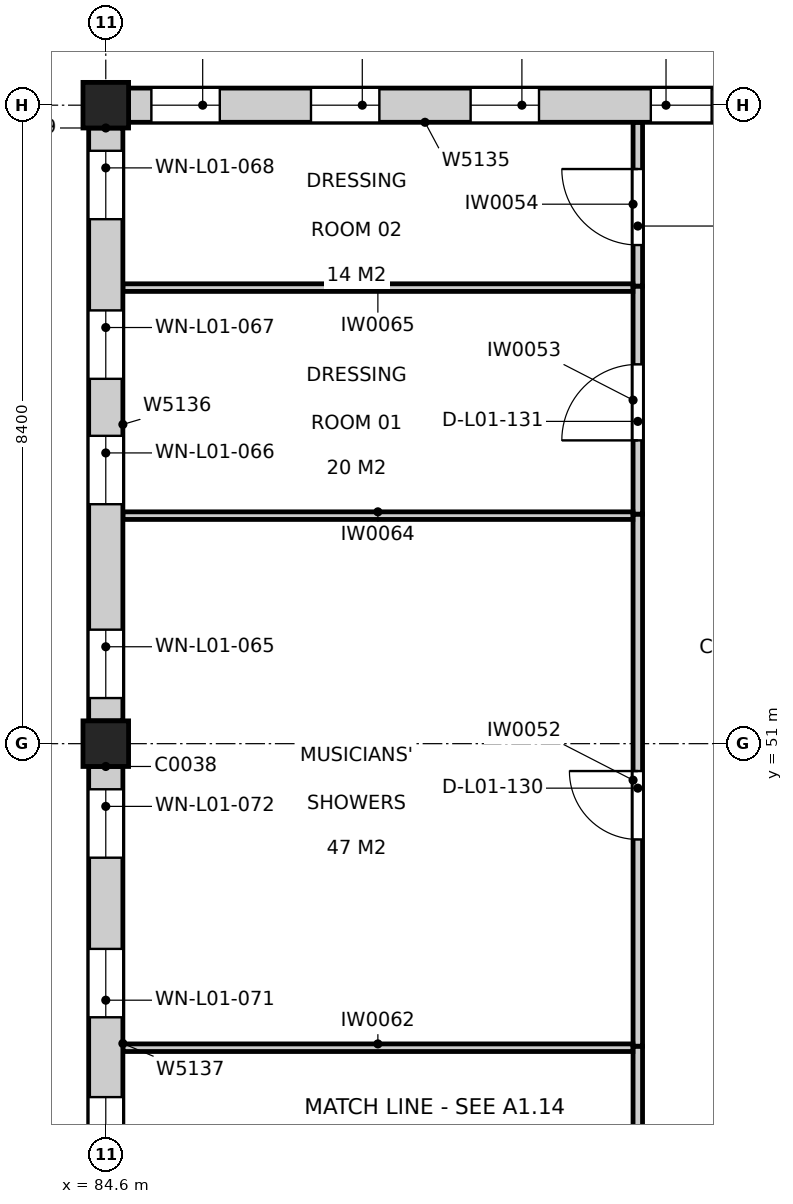
"""IFC4 building model, lengths in metres.
Left out: names, types, materials, properties, quantities, classifications, styles, units other than length and angle.
Written with IfcOpenShell. Run it as: python <this file> out.ifc"""

import sys

from ifc_helpers import new_model, si_unit, direction, frame, frame_2d, origin, origin_2d, place, context, subcontext, project, spatial, rectangle, extrude, element, fill, save


model = new_model("IFC4")
c1 = context("Model", 3, precision=1e-05, world=origin(), true_north=direction((0.0, 1.0)))
c2 = subcontext(c1, "Body", "Model", "MODEL_VIEW")
j1 = project(units=[si_unit("LENGTHUNIT", "METRE"), si_unit("PLANEANGLEUNIT", "RADIAN")], contexts=[c1])
p1 = place(None, origin())
s1 = spatial("IfcSite", under=j1, at=p1, CompositionType="ELEMENT")
p2 = place(p1, origin())
s2 = spatial("IfcBuilding", under=s1, at=p2, CompositionType="ELEMENT")
p3 = place(p2, frame((0.0, 0.0, 4.8)))
s3 = spatial("IfcBuildingStorey", under=s2, at=p3, CompositionType="ELEMENT", Elevation=4.8)
for number, where, z_axis, x_axis in (
    (1, (84.6, 51.0, 0.0), (0.0, 0.0, 1.0), (1.0, 0.0, 0.0)),
    (2, (84.6, 59.4, 0.0), (0.0, 0.0, 1.0), (1.0, 0.0, 0.0)),
):
    element("IfcColumn", number, at=place(p3, frame(where, z_axis=z_axis, x_axis=x_axis)), inside=s3, PredefinedType="COLUMN", context=c2, shape_type="SweptSolid", body=[
        extrude(rectangle(XDim=0.6, YDim=0.6, at=origin_2d()), origin(), (0.0, 0.0, 1.0), 4.8),
    ])
p4 = place(p3, frame((91.599, 42.717, 0.0), z_axis=(0.0, 0.0, 1.0), x_axis=(0.000226924598, 0.999999974253, 0.0)))
e3 = element("IfcWall", 3, at=p4, inside=s3, PredefinedType="PARTITIONING", context=c2, shape_type="SweptSolid", body=[
    extrude(rectangle(XDim=4.303, YDim=0.125, at=frame_2d((2.152, 0.0))), origin(), (0.0, 0.0, 1.0), 3.84),
])
p5 = place(p3, frame((91.6, 47.02, 0.0), z_axis=(0.0, 0.0, 1.0), x_axis=(0.0, 1.0, 0.0)))
e4 = element("IfcWall", 4, at=p5, inside=s3, PredefinedType="PARTITIONING", context=c2, shape_type="SweptSolid", body=[
    extrude(rectangle(XDim=7.0, YDim=0.125, at=frame_2d((3.5, 0.0))), origin(), (0.0, 0.0, 1.0), 3.84),
])
p6 = place(p5, frame((2.72, 0.0, 0.0)))
e5 = element("IfcOpeningElement", 5, at=p6, cuts=e4, PredefinedType="OPENING", context=c2, shape_type="SweptSolid", body=[
    extrude(rectangle(XDim=0.9, YDim=2.1, at=frame_2d((0.45, 1.05))), frame((0.0, 0.073, 0.0), z_axis=(0.0, -1.0, 0.0), x_axis=(1.0, 0.0, 0.0)), (0.0, 0.0, 1.0), 0.145),
])
p7 = place(p3, frame((91.6, 54.02, 0.0), z_axis=(0.0, 0.0, 1.0), x_axis=(0.0, 1.0, 0.0)))
e6 = element("IfcWall", 6, at=p7, inside=s3, PredefinedType="PARTITIONING", context=c2, shape_type="SweptSolid", body=[
    extrude(rectangle(XDim=3.0, YDim=0.125, at=frame_2d((1.5, 0.0))), origin(), (0.0, 0.0, 1.0), 3.94),
])
p8 = place(p7, frame((0.97, 0.0, 0.0)))
e7 = element("IfcOpeningElement", 7, at=p8, cuts=e6, PredefinedType="OPENING", context=c2, shape_type="SweptSolid", body=[
    extrude(rectangle(XDim=1.0, YDim=2.1, at=frame_2d((0.5, 1.05))), frame((0.0, 0.073, 0.0), z_axis=(0.0, -1.0, 0.0), x_axis=(1.0, 0.0, 0.0)), (0.0, 0.0, 1.0), 0.145),
])
p9 = place(p3, frame((91.6, 57.02, 0.0), z_axis=(0.0, 0.0, 1.0), x_axis=(0.0, 1.0, 0.0)))
e8 = element("IfcWall", 8, at=p9, inside=s3, PredefinedType="PARTITIONING", context=c2, shape_type="SweptSolid", body=[
    extrude(rectangle(XDim=2.155, YDim=0.125, at=frame_2d((1.077, 0.0))), origin(), (0.0, 0.0, 1.0), 4.64),
])
p10 = place(p9, frame((0.54, 0.0, 0.0)))
e9 = element("IfcOpeningElement", 9, at=p10, cuts=e8, PredefinedType="OPENING", context=c2, shape_type="SweptSolid", body=[
    extrude(rectangle(XDim=1.0, YDim=2.1, at=frame_2d((0.5, 1.05))), frame((0.0, 0.073, 0.0), z_axis=(0.0, -1.0, 0.0), x_axis=(1.0, 0.0, 0.0)), (0.0, 0.0, 1.0), 0.145),
])
p11 = place(p3, frame((84.825, 47.0, 0.0), z_axis=(0.0, 0.0, 1.0), x_axis=(1.0, 0.0, 0.0)))
e10 = element("IfcWall", 10, at=p11, inside=s3, PredefinedType="PARTITIONING", context=c2, shape_type="SweptSolid", body=[
    extrude(rectangle(XDim=6.71, YDim=0.1, at=frame_2d((3.355, 0.0))), origin(), (0.0, 0.0, 1.0), 4.64),
])
p12 = place(p3, frame((84.825, 54.0, 0.0), z_axis=(0.0, 0.0, 1.0), x_axis=(1.0, 0.0, 0.0)))
e11 = element("IfcWall", 11, at=p12, inside=s3, PredefinedType="PARTITIONING", context=c2, shape_type="SweptSolid", body=[
    extrude(rectangle(XDim=6.71, YDim=0.1, at=frame_2d((3.355, 0.0))), origin(), (0.0, 0.0, 1.0), 3.94),
])
p13 = place(p3, frame((84.825, 57.0, 0.0), z_axis=(0.0, 0.0, 1.0), x_axis=(1.0, 0.0, 0.0)))
e12 = element("IfcWall", 12, at=p13, inside=s3, PredefinedType="PARTITIONING", context=c2, shape_type="SweptSolid", body=[
    extrude(rectangle(XDim=6.71, YDim=0.1, at=frame_2d((3.355, 0.0))), origin(), (0.0, 0.0, 1.0), 4.64),
])
p14 = place(p3, frame((92.7, 59.4, 0.0), z_axis=(0.0, 0.0, 1.0), x_axis=(-1.0, 0.0, 0.0)))
e13 = element("IfcWall", 13, at=p14, inside=s3, PredefinedType="SOLIDWALL", context=c2, shape_type="SweptSolid", body=[
    extrude(rectangle(XDim=7.8, YDim=0.45, at=frame_2d((3.9, 0.0))), origin(), (0.0, 0.0, 1.0), 3.84),
])
p15 = place(p14, frame((6.6, 0.0, 1.8)))
e14 = element("IfcOpeningElement", 14, at=p15, cuts=e13, PredefinedType="OPENING", context=c2, shape_type="SweptSolid", body=[
    extrude(rectangle(XDim=0.9, YDim=0.6, at=frame_2d((0.45, 0.3))), frame((0.0, 0.235, 0.0), z_axis=(0.0, -1.0, 0.0), x_axis=(1.0, 0.0, 0.0)), (0.0, 0.0, 1.0), 0.47),
])
p16 = place(p14, frame((4.5, 0.0, 1.8)))
e15 = element("IfcOpeningElement", 15, at=p16, cuts=e13, PredefinedType="OPENING", context=c2, shape_type="SweptSolid", body=[
    extrude(rectangle(XDim=0.9, YDim=0.6, at=frame_2d((0.45, 0.3))), frame((0.0, 0.235, 0.0), z_axis=(0.0, -1.0, 0.0), x_axis=(1.0, 0.0, 0.0)), (0.0, 0.0, 1.0), 0.47),
])
p17 = place(p14, frame((2.4, 0.0, 1.8)))
e16 = element("IfcOpeningElement", 16, at=p17, cuts=e13, PredefinedType="OPENING", context=c2, shape_type="SweptSolid", body=[
    extrude(rectangle(XDim=0.9, YDim=0.6, at=frame_2d((0.45, 0.3))), frame((0.0, 0.235, 0.0), z_axis=(0.0, -1.0, 0.0), x_axis=(1.0, 0.0, 0.0)), (0.0, 0.0, 1.0), 0.47),
])
p18 = place(p14, frame((0.129, 0.0, 0.9)))
e17 = element("IfcOpeningElement", 17, at=p18, cuts=e13, PredefinedType="OPENING", context=c2, shape_type="SweptSolid", body=[
    extrude(rectangle(XDim=0.8, YDim=2.4, at=frame_2d((0.4, 1.2))), frame((0.0, 0.235, 0.0), z_axis=(0.0, -1.0, 0.0), x_axis=(1.0, 0.0, 0.0)), (0.0, 0.0, 1.0), 0.47),
])
p19 = place(p3, frame((84.6, 59.1, 0.0), z_axis=(0.0, 0.0, 1.0), x_axis=(0.0, -1.0, 0.0)))
e18 = element("IfcWall", 18, at=p19, inside=s3, PredefinedType="SOLIDWALL", context=c2, shape_type="SweptSolid", body=[
    extrude(rectangle(XDim=7.8, YDim=0.45, at=frame_2d((3.9, 0.0))), origin(), (0.0, 0.0, 1.0), 3.84),
])
p20 = place(p19, frame((6.6, 0.0, 1.8)))
e19 = element("IfcOpeningElement", 19, at=p20, cuts=e18, PredefinedType="OPENING", context=c2, shape_type="SweptSolid", body=[
    extrude(rectangle(XDim=0.9, YDim=0.6, at=frame_2d((0.45, 0.3))), frame((0.0, 0.235, 0.0), z_axis=(0.0, -1.0, 0.0), x_axis=(1.0, 0.0, 0.0)), (0.0, 0.0, 1.0), 0.47),
])
p21 = place(p19, frame((4.05, 0.0, 1.8)))
e20 = element("IfcOpeningElement", 20, at=p21, cuts=e18, PredefinedType="OPENING", context=c2, shape_type="SweptSolid", body=[
    extrude(rectangle(XDim=0.9, YDim=0.6, at=frame_2d((0.45, 0.3))), frame((0.0, 0.235, 0.0), z_axis=(0.0, -1.0, 0.0), x_axis=(1.0, 0.0, 0.0)), (0.0, 0.0, 1.0), 0.47),
])
p22 = place(p19, frame((2.4, 0.0, 1.8)))
e21 = element("IfcOpeningElement", 21, at=p22, cuts=e18, PredefinedType="OPENING", context=c2, shape_type="SweptSolid", body=[
    extrude(rectangle(XDim=0.9, YDim=0.6, at=frame_2d((0.45, 0.3))), frame((0.0, 0.235, 0.0), z_axis=(0.0, -1.0, 0.0), x_axis=(1.0, 0.0, 0.0)), (0.0, 0.0, 1.0), 0.47),
])
p23 = place(p19, frame((0.3, 0.0, 1.8)))
e22 = element("IfcOpeningElement", 22, at=p23, cuts=e18, PredefinedType="OPENING", context=c2, shape_type="SweptSolid", body=[
    extrude(rectangle(XDim=0.9, YDim=0.6, at=frame_2d((0.45, 0.3))), frame((0.0, 0.235, 0.0), z_axis=(0.0, -1.0, 0.0), x_axis=(1.0, 0.0, 0.0)), (0.0, 0.0, 1.0), 0.47),
])
p24 = place(p3, frame((84.6, 50.7, 0.0), z_axis=(0.0, 0.0, 1.0), x_axis=(0.0, -1.0, 0.0)))
e23 = element("IfcWall", 23, at=p24, inside=s3, PredefinedType="SOLIDWALL", context=c2, shape_type="SweptSolid", body=[
    extrude(rectangle(XDim=7.8, YDim=0.45, at=frame_2d((3.9, 0.0))), origin(), (0.0, 0.0, 1.0), 3.84),
])
p25 = place(p24, frame((6.45, 0.0, 0.9)))
e24 = element("IfcOpeningElement", 24, at=p25, cuts=e23, PredefinedType="OPENING", context=c2, shape_type="SweptSolid", body=[
    extrude(rectangle(XDim=1.2, YDim=2.4, at=frame_2d((0.6, 1.2))), frame((0.0, 0.235, 0.0), z_axis=(0.0, -1.0, 0.0), x_axis=(1.0, 0.0, 0.0)), (0.0, 0.0, 1.0), 0.47),
])
p26 = place(p24, frame((4.35, 0.0, 0.9)))
e25 = element("IfcOpeningElement", 25, at=p26, cuts=e23, PredefinedType="OPENING", context=c2, shape_type="SweptSolid", body=[
    extrude(rectangle(XDim=1.2, YDim=2.4, at=frame_2d((0.6, 1.2))), frame((0.0, 0.235, 0.0), z_axis=(0.0, -1.0, 0.0), x_axis=(1.0, 0.0, 0.0)), (0.0, 0.0, 1.0), 0.47),
])
p27 = place(p24, frame((2.4, 0.0, 1.8)))
e26 = element("IfcOpeningElement", 26, at=p27, cuts=e23, PredefinedType="OPENING", context=c2, shape_type="SweptSolid", body=[
    extrude(rectangle(XDim=0.9, YDim=0.6, at=frame_2d((0.45, 0.3))), frame((0.0, 0.235, 0.0), z_axis=(0.0, -1.0, 0.0), x_axis=(1.0, 0.0, 0.0)), (0.0, 0.0, 1.0), 0.47),
])
p28 = place(p24, frame((0.3, 0.0, 1.8)))
e27 = element("IfcOpeningElement", 27, at=p28, cuts=e23, PredefinedType="OPENING", context=c2, shape_type="SweptSolid", body=[
    extrude(rectangle(XDim=0.9, YDim=0.6, at=frame_2d((0.45, 0.3))), frame((0.0, 0.235, 0.0), z_axis=(0.0, -1.0, 0.0), x_axis=(1.0, 0.0, 0.0)), (0.0, 0.0, 1.0), 0.47),
])
p29 = place(p6, origin())
e28 = element("IfcDoor", 28, at=p29, inside=s3, OperationType="SINGLE_SWING_RIGHT", PredefinedType="DOOR", context=c2, shape_type="SweptSolid", body=[
    extrude(rectangle(XDim=0.9, YDim=2.1, at=frame_2d((0.45, 1.05))), frame((0.0, 0.025, 0.0), z_axis=(0.0, -1.0, 0.0), x_axis=(1.0, 0.0, 0.0)), (0.0, 0.0, 1.0), 0.05),
])
fill(e5, e28)
p30 = place(p8, origin())
e29 = element("IfcDoor", 29, at=p30, inside=s3, OperationType="SINGLE_SWING_LEFT", PredefinedType="DOOR", context=c2, shape_type="SweptSolid", body=[
    extrude(rectangle(XDim=1.0, YDim=2.1, at=frame_2d((0.5, 1.05))), frame((0.0, 0.025, 0.0), z_axis=(0.0, -1.0, 0.0), x_axis=(1.0, 0.0, 0.0)), (0.0, 0.0, 1.0), 0.05),
])
fill(e7, e29)
p31 = place(p10, origin())
e30 = element("IfcDoor", 30, at=p31, inside=s3, OperationType="SINGLE_SWING_RIGHT", PredefinedType="DOOR", context=c2, shape_type="SweptSolid", body=[
    extrude(rectangle(XDim=1.0, YDim=2.1, at=frame_2d((0.5, 1.05))), frame((0.0, 0.025, 0.0), z_axis=(0.0, -1.0, 0.0), x_axis=(1.0, 0.0, 0.0)), (0.0, 0.0, 1.0), 0.05),
])
fill(e9, e30)
p32 = place(p15, origin())
e31 = element("IfcWindow", 31, at=p32, inside=s3, PartitioningType="SINGLE_PANEL", PredefinedType="WINDOW", context=c2, shape_type="SweptSolid", body=[
    extrude(rectangle(XDim=0.9, YDim=0.6, at=frame_2d((0.45, 0.3))), frame((0.0, 0.035, 0.0), z_axis=(0.0, -1.0, 0.0), x_axis=(1.0, 0.0, 0.0)), (0.0, 0.0, 1.0), 0.06),
])
fill(e14, e31)
p33 = place(p16, origin())
e32 = element("IfcWindow", 32, at=p33, inside=s3, PartitioningType="SINGLE_PANEL", PredefinedType="WINDOW", context=c2, shape_type="SweptSolid", body=[
    extrude(rectangle(XDim=0.9, YDim=0.6, at=frame_2d((0.45, 0.3))), frame((0.0, 0.035, 0.0), z_axis=(0.0, -1.0, 0.0), x_axis=(1.0, 0.0, 0.0)), (0.0, 0.0, 1.0), 0.06),
])
fill(e15, e32)
p34 = place(p17, origin())
e33 = element("IfcWindow", 33, at=p34, inside=s3, PartitioningType="SINGLE_PANEL", PredefinedType="WINDOW", context=c2, shape_type="SweptSolid", body=[
    extrude(rectangle(XDim=0.9, YDim=0.6, at=frame_2d((0.45, 0.3))), frame((0.0, 0.035, 0.0), z_axis=(0.0, -1.0, 0.0), x_axis=(1.0, 0.0, 0.0)), (0.0, 0.0, 1.0), 0.06),
])
fill(e16, e33)
p35 = place(p18, origin())
e34 = element("IfcWindow", 34, at=p35, inside=s3, PartitioningType="SINGLE_PANEL", PredefinedType="WINDOW", context=c2, shape_type="SweptSolid", body=[
    extrude(rectangle(XDim=0.8, YDim=2.4, at=frame_2d((0.4, 1.2))), frame((0.0, 0.135, 0.0), z_axis=(0.0, -1.0, 0.0), x_axis=(1.0, 0.0, 0.0)), (0.0, 0.0, 1.0), 0.06),
])
fill(e17, e34)
p36 = place(p20, origin())
e35 = element("IfcWindow", 35, at=p36, inside=s3, PartitioningType="SINGLE_PANEL", PredefinedType="WINDOW", context=c2, shape_type="SweptSolid", body=[
    extrude(rectangle(XDim=0.9, YDim=0.6, at=frame_2d((0.45, 0.3))), frame((0.0, 0.035, 0.0), z_axis=(0.0, -1.0, 0.0), x_axis=(1.0, 0.0, 0.0)), (0.0, 0.0, 1.0), 0.06),
])
fill(e19, e35)
p37 = place(p21, origin())
e36 = element("IfcWindow", 36, at=p37, inside=s3, PartitioningType="SINGLE_PANEL", PredefinedType="WINDOW", context=c2, shape_type="SweptSolid", body=[
    extrude(rectangle(XDim=0.9, YDim=0.6, at=frame_2d((0.45, 0.3))), frame((0.0, 0.035, 0.0), z_axis=(0.0, -1.0, 0.0), x_axis=(1.0, 0.0, 0.0)), (0.0, 0.0, 1.0), 0.06),
])
fill(e20, e36)
p38 = place(p22, origin())
e37 = element("IfcWindow", 37, at=p38, inside=s3, PartitioningType="SINGLE_PANEL", PredefinedType="WINDOW", context=c2, shape_type="SweptSolid", body=[
    extrude(rectangle(XDim=0.9, YDim=0.6, at=frame_2d((0.45, 0.3))), frame((0.0, 0.035, 0.0), z_axis=(0.0, -1.0, 0.0), x_axis=(1.0, 0.0, 0.0)), (0.0, 0.0, 1.0), 0.06),
])
fill(e21, e37)
p39 = place(p23, origin())
e38 = element("IfcWindow", 38, at=p39, inside=s3, PartitioningType="SINGLE_PANEL", PredefinedType="WINDOW", context=c2, shape_type="SweptSolid", body=[
    extrude(rectangle(XDim=0.9, YDim=0.6, at=frame_2d((0.45, 0.3))), frame((0.0, 0.035, 0.0), z_axis=(0.0, -1.0, 0.0), x_axis=(1.0, 0.0, 0.0)), (0.0, 0.0, 1.0), 0.06),
])
fill(e22, e38)
p40 = place(p26, origin())
e39 = element("IfcWindow", 39, at=p40, inside=s3, PartitioningType="SINGLE_PANEL", PredefinedType="WINDOW", context=c2, shape_type="SweptSolid", body=[
    extrude(rectangle(XDim=1.2, YDim=2.4, at=frame_2d((0.6, 1.2))), frame((0.0, 0.135, 0.0), z_axis=(0.0, -1.0, 0.0), x_axis=(1.0, 0.0, 0.0)), (0.0, 0.0, 1.0), 0.06),
])
fill(e25, e39)
p41 = place(p27, origin())
e40 = element("IfcWindow", 40, at=p41, inside=s3, PartitioningType="SINGLE_PANEL", PredefinedType="WINDOW", context=c2, shape_type="SweptSolid", body=[
    extrude(rectangle(XDim=0.9, YDim=0.6, at=frame_2d((0.45, 0.3))), frame((0.0, 0.035, 0.0), z_axis=(0.0, -1.0, 0.0), x_axis=(1.0, 0.0, 0.0)), (0.0, 0.0, 1.0), 0.06),
])
fill(e26, e40)
p42 = place(p28, origin())
e41 = element("IfcWindow", 41, at=p42, inside=s3, PartitioningType="SINGLE_PANEL", PredefinedType="WINDOW", context=c2, shape_type="SweptSolid", body=[
    extrude(rectangle(XDim=0.9, YDim=0.6, at=frame_2d((0.45, 0.3))), frame((0.0, 0.035, 0.0), z_axis=(0.0, -1.0, 0.0), x_axis=(1.0, 0.0, 0.0)), (0.0, 0.0, 1.0), 0.06),
])
fill(e27, e41)
save(model, sys.argv[1])
